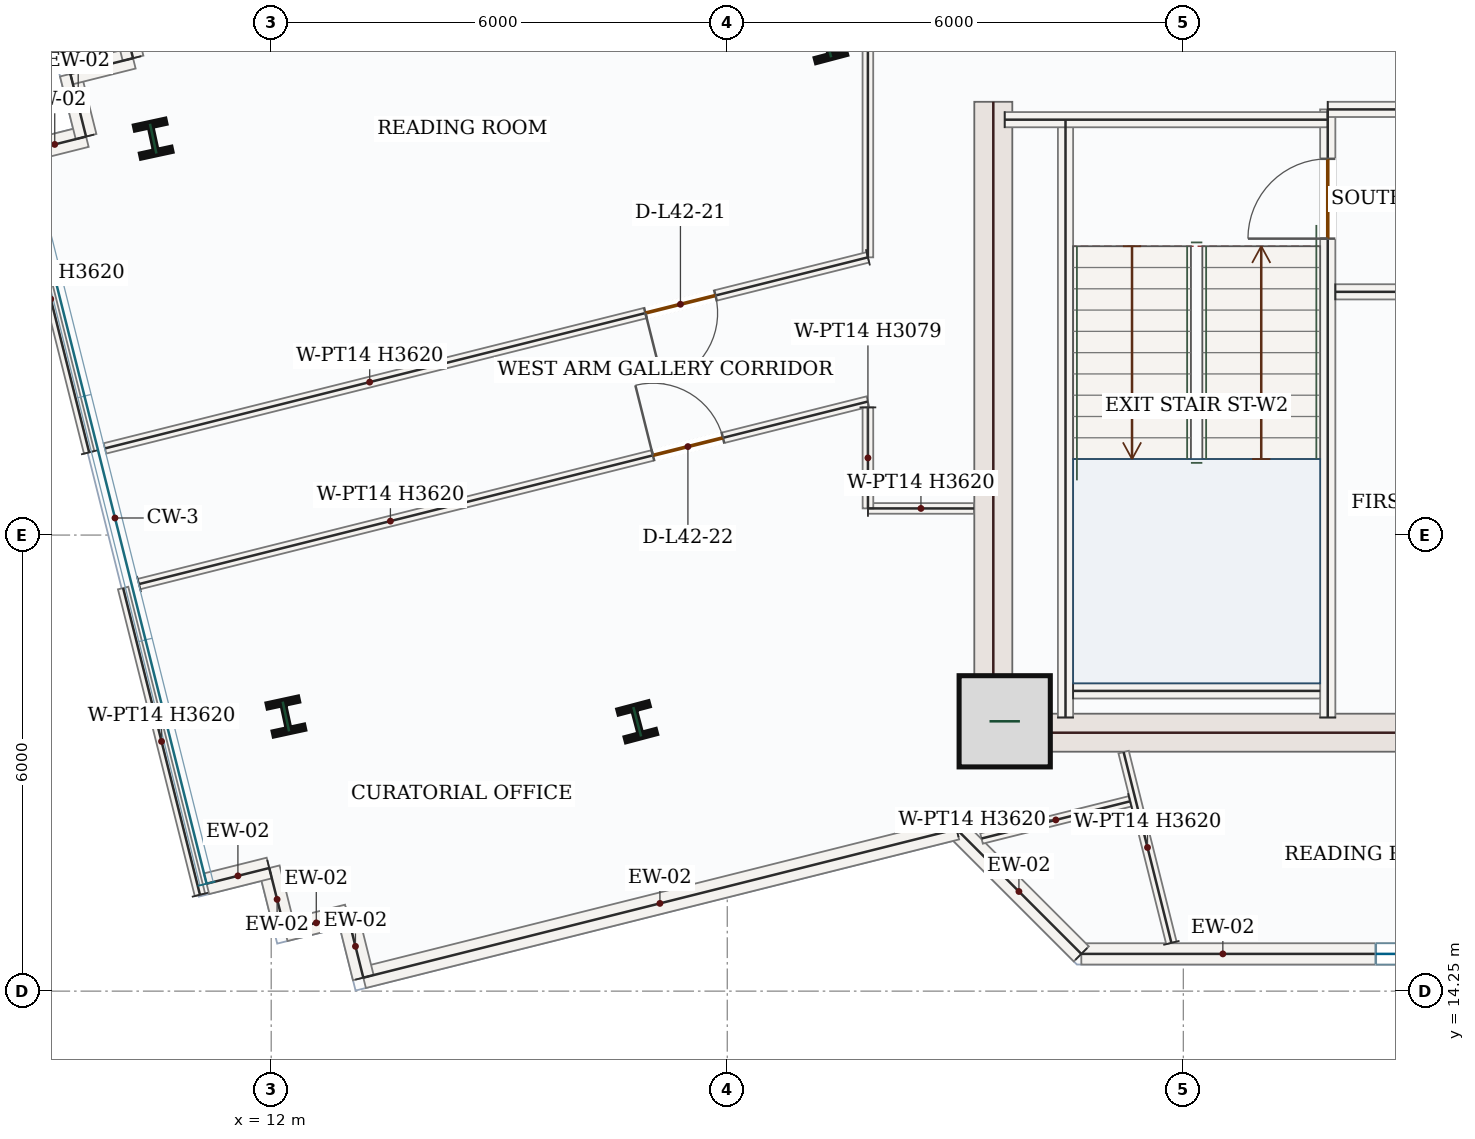
"""IFC4 building model, lengths in metres.
Left out: names, types, materials, properties, quantities, classifications, styles, units other than length and angle.
Written with IfcOpenShell. Run it as: python <this file> out.ifc"""

import sys

from ifc_helpers import new_model, si_unit, direction, frame, frame_2d, origin, origin_2d, place, context, subcontext, project, spatial, rectangle, i_section, extrude, source, transform, mapped, element, fill, save


model = new_model("IFC4")
c1 = context("Model", 3, precision=1e-05, world=origin(), true_north=direction((0.0, 1.0)))
c2 = subcontext(c1, "Body", "Model", "MODEL_VIEW")
j1 = project(units=[si_unit("LENGTHUNIT", "METRE"), si_unit("PLANEANGLEUNIT", "RADIAN")], contexts=[c1])
p1 = place(None, origin())
s1 = spatial("IfcSite", under=j1, at=p1, CompositionType="ELEMENT")
p2 = place(p1, origin())
s2 = spatial("IfcBuilding", under=s1, at=p2, CompositionType="ELEMENT")
p3 = place(p2, frame((0.0, 0.0, 182.4)))
s3 = spatial("IfcBuildingStorey", under=s2, at=p3, CompositionType="ELEMENT", Elevation=182.4)
m1 = source(origin(), c2, "Body", "SweptSolid", [
    extrude(rectangle(XDim=8.55, YDim=0.5, at=frame_2d((4.275, 0.0))), origin(), (0.0, 0.0, 1.0), 3.62),
])
p4 = place(p3, frame((21.5, 17.4, 0.0), z_axis=(0.0, 0.0, 1.0), x_axis=(0.0, 1.0, 0.0)))
e1 = element("IfcWall", 1, at=p4, inside=s3, PredefinedType="SHEAR", context=c2, shape_type="MappedRepresentation", body=[
    mapped(m1, transform((0.0, 0.0, 0.0), x_axis=(1.0, 0.0, 0.0), y_axis=(0.0, 1.0, 0.0), z_axis=(0.0, 0.0, 1.0), scale=1.0)),
])
m2 = source(origin(), c2, "Body", "SweptSolid", [
    extrude(rectangle(XDim=7.0, YDim=0.5, at=frame_2d((3.5, 0.0))), origin(), (0.0, 0.0, 1.0), 3.62),
])
p5 = place(p3, frame((21.75, 17.65, 0.0), z_axis=(0.0, 0.0, 1.0), x_axis=(1.0, 0.0, 0.0)))
e2 = element("IfcWall", 2, at=p5, inside=s3, PredefinedType="SHEAR", context=c2, shape_type="MappedRepresentation", body=[
    mapped(m2, transform((0.0, 0.0, 0.0), x_axis=(1.0, 0.0, 0.0), y_axis=(0.0, 1.0, 0.0), z_axis=(0.0, 0.0, 1.0), scale=1.0)),
])
m3 = source(origin(), c2, "Body", "SweptSolid", [
    extrude(rectangle(XDim=1.2, YDim=1.2, at=origin_2d()), origin(), (0.0, 0.0, 1.0), 3.9),
])
p6 = place(p3, frame((21.65, 17.8, 0.0), z_axis=(0.0, 0.0, 1.0), x_axis=(1.0, 0.0, 0.0)))
e3 = element("IfcColumn", 3, at=p6, inside=s3, PredefinedType="COLUMN", context=c2, shape_type="MappedRepresentation", body=[
    mapped(m3, transform((0.0, 0.0, 0.0), x_axis=(1.0, 0.0, 0.0), y_axis=(0.0, 1.0, 0.0), z_axis=(0.0, 0.0, 1.0), scale=1.0)),
])
m4 = source(origin(), c2, "Body", "SweptSolid", [
    extrude(i_section(OverallWidth=0.412, OverallDepth=0.435, WebThickness=0.036, FlangeThickness=0.057, FilletRadius=0.018, at=origin_2d()), origin(), (0.0, 0.0, 1.0), 3.9),
])
for number, where, z_axis, x_axis in (
    (4, (19.316, 26.729, 0.0), (0.0, 0.0, 1.0), (0.967, 0.255, 0.0)),
    (5, (16.815, 17.794, 0.0), (0.0, 0.0, 1.0), (0.967, 0.255, 0.0)),
    (6, (10.447, 25.465, 0.0), (0.0, 0.0, 1.0), (0.977, 0.211, 0.0)),
    (7, (12.193, 17.863, 0.0), (0.0, 0.0, 1.0), (0.977, 0.211, 0.0)),
):
    element("IfcColumn", number, at=place(p3, frame(where, z_axis=z_axis, x_axis=x_axis)), inside=s3, PredefinedType="COLUMN", context=c2, shape_type="MappedRepresentation", body=[
        mapped(m4, transform((0.0, 0.0, 0.0), x_axis=(1.0, 0.0, 0.0), y_axis=(0.0, 1.0, 0.0), z_axis=(0.0, 0.0, 1.0), scale=1.0)),
    ])
p7 = place(p3, frame((32.205, 14.74, 0.0), z_axis=(0.0, 0.0, 1.0), x_axis=(-1.0, 0.0, 0.0)))
e8 = element("IfcWall", 8, at=p7, inside=s3, PredefinedType="SOLIDWALL", context=c2, shape_type="SweptSolid", body=[
    extrude(rectangle(XDim=9.547, YDim=0.28, at=frame_2d((4.773, 0.0))), origin(), (0.0, 0.0, 1.0), 3.62),
])
p8 = place(p7, frame((3.873, 0.0, 0.85)))
e9 = element("IfcOpeningElement", 9, at=p8, cuts=e8, PredefinedType="OPENING", context=c2, shape_type="SweptSolid", body=[
    extrude(rectangle(XDim=1.8, YDim=1.75, at=frame_2d((0.9, 0.875))), frame((0.0, 0.15, 0.0), z_axis=(0.0, -1.0, 0.0), x_axis=(1.0, 0.0, 0.0)), (0.0, 0.0, 1.0), 0.3),
])
m5 = source(origin(), c2, "Body", "SweptSolid", [
    extrude(rectangle(XDim=2.322, YDim=0.28, at=frame_2d((1.161, 0.0))), origin(), (0.0, 0.0, 1.0), 3.62),
])
p9 = place(p3, frame((22.658, 14.74, 0.0), z_axis=(0.0, 0.0, 1.0), x_axis=(-0.707106781187, 0.707106781187, 0.0)))
e10 = element("IfcWall", 10, at=p9, inside=s3, PredefinedType="SOLIDWALL", context=c2, shape_type="MappedRepresentation", body=[
    mapped(m5, transform((0.0, 0.0, 0.0), x_axis=(1.0, 0.0, 0.0), y_axis=(0.0, 1.0, 0.0), z_axis=(0.0, 0.0, 1.0), scale=1.0)),
])
m6 = source(origin(), c2, "Body", "SweptSolid", [
    extrude(rectangle(XDim=8.045, YDim=0.28, at=frame_2d((4.023, 0.0))), origin(), (0.0, 0.0, 1.0), 3.62),
])
p10 = place(p3, frame((21.016, 16.382, 0.0), z_axis=(0.0, 0.0, 1.0), x_axis=(-0.970040669564, -0.242942584557, 0.0)))
e11 = element("IfcWall", 11, at=p10, inside=s3, PredefinedType="SOLIDWALL", context=c2, shape_type="MappedRepresentation", body=[
    mapped(m6, transform((0.0, 0.0, 0.0), x_axis=(1.0, 0.0, 0.0), y_axis=(0.0, 1.0, 0.0), z_axis=(0.0, 0.0, 1.0), scale=1.0)),
])
m7 = source(origin(), c2, "Body", "SweptSolid", [
    extrude(rectangle(XDim=0.85, YDim=0.28, at=frame_2d((0.425, 0.0))), origin(), (0.0, 0.0, 1.0), 3.62),
])
for number, where, z_axis, x_axis in (
    (12, (13.212, 14.427, 0.0), (0.0, 0.0, 1.0), (-0.243, 0.97, 0.0)),
    (13, (13.005, 15.252, 0.0), (0.0, 0.0, 1.0), (-0.97, -0.243, 0.0)),
):
    element("IfcWall", number, at=place(p3, frame(where, z_axis=z_axis, x_axis=x_axis)), inside=s3, PredefinedType="SOLIDWALL", context=c2, shape_type="MappedRepresentation", body=[
        mapped(m7, transform((0.0, 0.0, 0.0), x_axis=(1.0, 0.0, 0.0), y_axis=(0.0, 1.0, 0.0), z_axis=(0.0, 0.0, 1.0), scale=1.0)),
    ])
m8 = source(origin(), c2, "Body", "SweptSolid", [
    extrude(rectangle(XDim=0.85, YDim=0.28, at=frame_2d((0.425, 0.0))), origin(), (0.0, 0.0, 1.0), 3.62),
])
p11 = place(p3, frame((12.181, 15.045, 0.0), z_axis=(0.0, 0.0, 1.0), x_axis=(-0.242941012307, 0.970041063326, 0.0)))
e14 = element("IfcWall", 14, at=p11, inside=s3, PredefinedType="SOLIDWALL", context=c2, shape_type="MappedRepresentation", body=[
    mapped(m8, transform((0.0, 0.0, 0.0), x_axis=(1.0, 0.0, 0.0), y_axis=(0.0, 1.0, 0.0), z_axis=(0.0, 0.0, 1.0), scale=1.0)),
])
for number, where, z_axis, x_axis in (
    (15, (11.974, 15.87, 0.0), (0.0, 0.0, 1.0), (-0.97, -0.243, 0.0)),
    (16, (8.74, 25.286, 0.0), (0.0, 0.0, 1.0), (0.97, 0.243, 0.0)),
    (17, (9.564, 25.493, 0.0), (0.0, 0.0, 1.0), (-0.243, 0.97, 0.0)),
):
    element("IfcWall", number, at=place(p3, frame(where, z_axis=z_axis, x_axis=x_axis)), inside=s3, PredefinedType="SOLIDWALL", context=c2, shape_type="MappedRepresentation", body=[
        mapped(m7, transform((0.0, 0.0, 0.0), x_axis=(1.0, 0.0, 0.0), y_axis=(0.0, 1.0, 0.0), z_axis=(0.0, 0.0, 1.0), scale=1.0)),
    ])
p12 = place(p3, frame((9.358, 26.317, 0.0), z_axis=(0.0, 0.0, 1.0), x_axis=(0.970041063326, 0.242941012307, 0.0)))
e18 = element("IfcWall", 18, at=p12, inside=s3, PredefinedType="SOLIDWALL", context=c2, shape_type="MappedRepresentation", body=[
    mapped(m8, transform((0.0, 0.0, 0.0), x_axis=(1.0, 0.0, 0.0), y_axis=(0.0, 1.0, 0.0), z_axis=(0.0, 0.0, 1.0), scale=1.0)),
])
p13 = place(p3, frame((10.182, 26.524, 0.0), z_axis=(0.0, 0.0, 1.0), x_axis=(-0.243008704507, 0.970024107708, 0.0)))
e19 = element("IfcWall", 19, at=p13, inside=s3, PredefinedType="SOLIDWALL", context=c2, shape_type="MappedRepresentation", body=[
    mapped(m7, transform((0.0, 0.0, 0.0), x_axis=(1.0, 0.0, 0.0), y_axis=(0.0, 1.0, 0.0), z_axis=(0.0, 0.0, 1.0), scale=1.0)),
])
m9 = source(origin(), c2, "Body", "SweptSolid", [
    extrude(rectangle(XDim=7.87, YDim=0.2, at=frame_2d((3.935, 0.0))), origin(), (0.0, 0.0, 1.0), 3.62),
])
p14 = place(p3, frame((22.45, 17.85, 0.0), z_axis=(0.0, 0.0, 1.0), x_axis=(0.0, 1.0, 0.0)))
e20 = element("IfcWall", 20, at=p14, inside=s3, PredefinedType="SOLIDWALL", context=c2, shape_type="MappedRepresentation", body=[
    mapped(m9, transform((0.0, 0.0, 0.0), x_axis=(1.0, 0.0, 0.0), y_axis=(0.0, 1.0, 0.0), z_axis=(0.0, 0.0, 1.0), scale=1.0)),
])
p15 = place(p3, frame((25.9, 17.85, 0.0), z_axis=(0.0, 0.0, 1.0), x_axis=(0.0, 1.0, 0.0)))
e21 = element("IfcWall", 21, at=p15, inside=s3, PredefinedType="SOLIDWALL", context=c2, shape_type="SweptSolid", body=[
    extrude(rectangle(XDim=8.0, YDim=0.2, at=frame_2d((4.0, 0.0))), origin(), (0.0, 0.0, 1.0), 3.62),
])
p16 = place(p15, frame((6.3, 0.0, 0.0)))
e22 = element("IfcOpeningElement", 22, at=p16, cuts=e21, PredefinedType="OPENING", context=c2, shape_type="SweptSolid", body=[
    extrude(rectangle(XDim=1.05, YDim=2.15, at=frame_2d((0.525, 1.075))), frame((0.0, 0.11, 0.0), z_axis=(0.0, -1.0, 0.0), x_axis=(1.0, 0.0, 0.0)), (0.0, 0.0, 1.0), 0.22),
])
m10 = source(origin(), c2, "Body", "SweptSolid", [
    extrude(rectangle(XDim=4.25, YDim=0.2, at=frame_2d((2.125, 0.0))), origin(), (0.0, 0.0, 1.0), 3.62),
])
p17 = place(p3, frame((21.65, 25.715, 0.0), z_axis=(0.0, 0.0, 1.0), x_axis=(1.0, 0.0, 0.0)))
e23 = element("IfcWall", 23, at=p17, inside=s3, PredefinedType="SOLIDWALL", context=c2, shape_type="MappedRepresentation", body=[
    mapped(m10, transform((0.0, 0.0, 0.0), x_axis=(1.0, 0.0, 0.0), y_axis=(0.0, 1.0, 0.0), z_axis=(0.0, 0.0, 1.0), scale=1.0)),
])
m11 = source(origin(), c2, "Body", "SweptSolid", [
    extrude(rectangle(XDim=3.0, YDim=0.2, at=frame_2d((1.5, 0.0))), origin(), (0.0, 0.0, 1.0), 3.62),
])
p18 = place(p3, frame((25.9, 25.85, 0.0), z_axis=(0.0, 0.0, 1.0), x_axis=(1.0, 0.0, 0.0)))
e24 = element("IfcWall", 24, at=p18, inside=s3, PredefinedType="SOLIDWALL", context=c2, shape_type="MappedRepresentation", body=[
    mapped(m11, transform((0.0, 0.0, 0.0), x_axis=(1.0, 0.0, 0.0), y_axis=(0.0, 1.0, 0.0), z_axis=(0.0, 0.0, 1.0), scale=1.0)),
])
m12 = source(origin(), c2, "Body", "SweptSolid", [
    extrude(rectangle(XDim=3.25, YDim=0.2, at=frame_2d((1.625, 0.0))), origin(), (0.0, 0.0, 1.0), 3.62),
])
p19 = place(p3, frame((22.55, 18.2, 0.0), z_axis=(0.0, 0.0, 1.0), x_axis=(1.0, 0.0, 0.0)))
e25 = element("IfcWall", 25, at=p19, inside=s3, PredefinedType="SOLIDWALL", context=c2, shape_type="MappedRepresentation", body=[
    mapped(m12, transform((0.0, 0.0, 0.0), x_axis=(1.0, 0.0, 0.0), y_axis=(0.0, 1.0, 0.0), z_axis=(0.0, 0.0, 1.0), scale=1.0)),
])
m13 = source(origin(), c2, "Body", "SweptSolid", [
    extrude(rectangle(XDim=2.75, YDim=0.2, at=frame_2d((1.375, 0.0))), origin(), (0.0, 0.0, 1.0), 3.62),
])
p20 = place(p3, frame((26.0, 23.45, 0.0), z_axis=(0.0, 0.0, 1.0), x_axis=(1.0, 0.0, 0.0)))
e26 = element("IfcWall", 26, at=p20, inside=s3, PredefinedType="SOLIDWALL", context=c2, shape_type="MappedRepresentation", body=[
    mapped(m13, transform((0.0, 0.0, 0.0), x_axis=(1.0, 0.0, 0.0), y_axis=(0.0, 1.0, 0.0), z_axis=(0.0, 0.0, 1.0), scale=1.0)),
])
m14 = source(origin(), c2, "Body", "SweptSolid", [
    extrude(rectangle(XDim=2.588, YDim=0.14, at=frame_2d((1.294, 0.0))), origin(), (0.0, 0.0, 1.0), 3.62),
])
p21 = place(p3, frame((23.843, 14.885, 0.0), z_axis=(0.0, 0.0, 1.0), x_axis=(-0.242957412811, 0.97003695577, 0.0)))
e27 = element("IfcWall", 27, at=p21, inside=s3, PredefinedType="PARTITIONING", context=c2, shape_type="MappedRepresentation", body=[
    mapped(m14, transform((0.0, 0.0, 0.0), x_axis=(1.0, 0.0, 0.0), y_axis=(0.0, 1.0, 0.0), z_axis=(0.0, 0.0, 1.0), scale=1.0)),
])
m15 = source(origin(), c2, "Body", "SweptSolid", [
    extrude(rectangle(XDim=1.394, YDim=0.14, at=frame_2d((0.697, 0.0))), origin(), (0.0, 0.0, 1.0), 3.62),
])
p22 = place(p3, frame((19.851, 20.601, 0.0), z_axis=(0.0, 0.0, 1.0), x_axis=(0.999999754632, -0.000700525222, 0.0)))
e28 = element("IfcWall", 28, at=p22, inside=s3, PredefinedType="PARTITIONING", context=c2, shape_type="MappedRepresentation", body=[
    mapped(m15, transform((0.0, 0.0, 0.0), x_axis=(1.0, 0.0, 0.0), y_axis=(0.0, 1.0, 0.0), z_axis=(0.0, 0.0, 1.0), scale=1.0)),
])
m16 = source(origin(), c2, "Body", "SweptSolid", [
    extrude(rectangle(XDim=2.014, YDim=0.14, at=frame_2d((1.007, 0.0))), origin(), (0.0, 0.0, 1.0), 3.62),
])
p23 = place(p3, frame((23.299, 16.747, 0.0), z_axis=(0.0, 0.0, 1.0), x_axis=(-0.970056889313, -0.242877811867, 0.0)))
e29 = element("IfcWall", 29, at=p23, inside=s3, PredefinedType="PARTITIONING", context=c2, shape_type="MappedRepresentation", body=[
    mapped(m16, transform((0.0, 0.0, 0.0), x_axis=(1.0, 0.0, 0.0), y_axis=(0.0, 1.0, 0.0), z_axis=(0.0, 0.0, 1.0), scale=1.0)),
])
m17 = source(origin(), c2, "Body", "SweptSolid", [
    extrude(rectangle(XDim=4.16, YDim=0.14, at=frame_2d((2.08, 0.0))), origin(), (0.0, 0.0, 1.0), 3.62),
])
p24 = place(p3, frame((11.062, 15.518, 0.0), z_axis=(0.0, 0.0, 1.0), x_axis=(-0.242963670411, 0.970035388458, 0.0)))
e30 = element("IfcWall", 30, at=p24, inside=s3, PredefinedType="PARTITIONING", context=c2, shape_type="MappedRepresentation", body=[
    mapped(m17, transform((0.0, 0.0, 0.0), x_axis=(1.0, 0.0, 0.0), y_axis=(0.0, 1.0, 0.0), z_axis=(0.0, 0.0, 1.0), scale=1.0)),
])
p25 = place(p3, frame((10.26, 19.605, 0.0), z_axis=(0.0, 0.0, 1.0), x_axis=(0.970042179759, 0.242936554451, 0.0)))
e31 = element("IfcWall", 31, at=p25, inside=s3, PredefinedType="PARTITIONING", context=c2, shape_type="SweptSolid", body=[
    extrude(rectangle(XDim=9.886, YDim=0.14, at=frame_2d((4.943, 0.0))), origin(), (0.0, 0.0, 1.0), 3.62),
])
p26 = place(p25, frame((6.97, 0.0, 0.0)))
e32 = element("IfcOpeningElement", 32, at=p26, cuts=e31, PredefinedType="OPENING", context=c2, shape_type="SweptSolid", body=[
    extrude(rectangle(XDim=0.95, YDim=2.15, at=frame_2d((0.475, 1.075))), frame((0.0, 0.08, 0.0), z_axis=(0.0, -1.0, 0.0), x_axis=(1.0, 0.0, 0.0)), (0.0, 0.0, 1.0), 0.16),
])
m18 = source(origin(), c2, "Body", "SweptSolid", [
    extrude(rectangle(XDim=1.329, YDim=0.14, at=frame_2d((0.664, 0.0))), origin(), (0.0, 0.0, 1.0), 3.079),
])
p27 = place(p3, frame((19.85, 21.93, 0.0), z_axis=(0.0, 0.0, 1.0), x_axis=(0.00073502369, -0.99999972987, 0.0)))
e33 = element("IfcWall", 33, at=p27, inside=s3, PredefinedType="PARTITIONING", context=c2, shape_type="MappedRepresentation", body=[
    mapped(m18, transform((0.0, 0.0, 0.0), x_axis=(1.0, 0.0, 0.0), y_axis=(0.0, 1.0, 0.0), z_axis=(0.0, 0.0, 1.0), scale=1.0)),
])
p28 = place(p3, frame((9.605, 21.338, 0.0), z_axis=(0.0, 0.0, 1.0), x_axis=(-0.242963670411, 0.970035388458, 0.0)))
e34 = element("IfcWall", 34, at=p28, inside=s3, PredefinedType="PARTITIONING", context=c2, shape_type="MappedRepresentation", body=[
    mapped(m17, transform((0.0, 0.0, 0.0), x_axis=(1.0, 0.0, 0.0), y_axis=(0.0, 1.0, 0.0), z_axis=(0.0, 0.0, 1.0), scale=1.0)),
])
m19 = source(origin(), c2, "Body", "SweptSolid", [
    extrude(rectangle(XDim=6.046, YDim=0.14, at=frame_2d((3.023, 0.0))), origin(), (0.0, 0.0, 1.0), 2.693),
])
p29 = place(p3, frame((19.85, 29.95, 0.0), z_axis=(0.0, 0.0, 1.0), x_axis=(0.0, -1.0, 0.0)))
e35 = element("IfcWall", 35, at=p29, inside=s3, PredefinedType="PARTITIONING", context=c2, shape_type="MappedRepresentation", body=[
    mapped(m19, transform((0.0, 0.0, 0.0), x_axis=(1.0, 0.0, 0.0), y_axis=(0.0, 1.0, 0.0), z_axis=(0.0, 0.0, 1.0), scale=1.0)),
])
p30 = place(p3, frame((19.85, 23.904, 0.0), z_axis=(0.0, 0.0, 1.0), x_axis=(-0.97004665335, -0.24291869077, 0.0)))
e36 = element("IfcWall", 36, at=p30, inside=s3, PredefinedType="PARTITIONING", context=c2, shape_type="SweptSolid", body=[
    extrude(rectangle(XDim=10.347, YDim=0.14, at=frame_2d((5.173, 0.0))), origin(), (0.0, 0.0, 1.0), 3.62),
])
p31 = place(p30, frame((2.067, 0.0, 0.0)))
e37 = element("IfcOpeningElement", 37, at=p31, cuts=e36, PredefinedType="OPENING", context=c2, shape_type="SweptSolid", body=[
    extrude(rectangle(XDim=0.95, YDim=2.15, at=frame_2d((0.475, 1.075))), frame((0.0, 0.08, 0.0), z_axis=(0.0, -1.0, 0.0), x_axis=(1.0, 0.0, 0.0)), (0.0, 0.0, 1.0), 0.16),
])
m20 = source(origin(), c2, "Body", "SweptSolid", [
    extrude(rectangle(XDim=1.8, YDim=1.75, at=frame_2d((0.9, 0.875))), frame((0.0, 0.03, 0.0), z_axis=(0.0, -1.0, 0.0), x_axis=(1.0, 0.0, 0.0)), (0.0, 0.0, 1.0), 0.06),
])
p32 = place(p8, origin())
e38 = element("IfcWindow", 38, at=p32, inside=s3, PartitioningType="DOUBLE_PANEL_VERTICAL", PredefinedType="WINDOW", context=c2, shape_type="MappedRepresentation", body=[
    mapped(m20, transform((0.0, 0.0, 0.0), x_axis=(1.0, 0.0, 0.0), y_axis=(0.0, 1.0, 0.0), z_axis=(0.0, 0.0, 1.0), scale=1.0)),
])
fill(e9, e38)
m21 = source(origin(), c2, "Body", "SweptSolid", [
    extrude(rectangle(XDim=1.05, YDim=2.15, at=frame_2d((0.525, 1.075))), frame((0.0, 0.025, 0.0), z_axis=(0.0, -1.0, 0.0), x_axis=(1.0, 0.0, 0.0)), (0.0, 0.0, 1.0), 0.05),
])
p33 = place(p16, origin())
e39 = element("IfcDoor", 39, at=p33, inside=s3, OperationType="SINGLE_SWING_LEFT", PredefinedType="DOOR", context=c2, shape_type="MappedRepresentation", body=[
    mapped(m21, transform((0.0, 0.0, 0.0), x_axis=(1.0, 0.0, 0.0), y_axis=(0.0, 1.0, 0.0), z_axis=(0.0, 0.0, 1.0), scale=1.0)),
])
fill(e22, e39)
m22 = source(origin(), c2, "Body", "SweptSolid", [
    extrude(rectangle(XDim=0.95, YDim=2.15, at=frame_2d((0.475, 1.075))), frame((0.0, 0.025, 0.0), z_axis=(0.0, -1.0, 0.0), x_axis=(1.0, 0.0, 0.0)), (0.0, 0.0, 1.0), 0.05),
])
p34 = place(p31, origin())
e40 = element("IfcDoor", 40, at=p34, inside=s3, OperationType="SINGLE_SWING_RIGHT", PredefinedType="DOOR", context=c2, shape_type="MappedRepresentation", body=[
    mapped(m22, transform((0.0, 0.0, 0.0), x_axis=(1.0, 0.0, 0.0), y_axis=(0.0, 1.0, 0.0), z_axis=(0.0, 0.0, 1.0), scale=1.0)),
])
fill(e37, e40)
p35 = place(p26, origin())
e41 = element("IfcDoor", 41, at=p35, inside=s3, OperationType="SINGLE_SWING_LEFT", PredefinedType="DOOR", context=c2, shape_type="MappedRepresentation", body=[
    mapped(m22, transform((0.0, 0.0, 0.0), x_axis=(1.0, 0.0, 0.0), y_axis=(0.0, 1.0, 0.0), z_axis=(0.0, 0.0, 1.0), scale=1.0)),
])
fill(e32, e41)
save(model, sys.argv[1])
